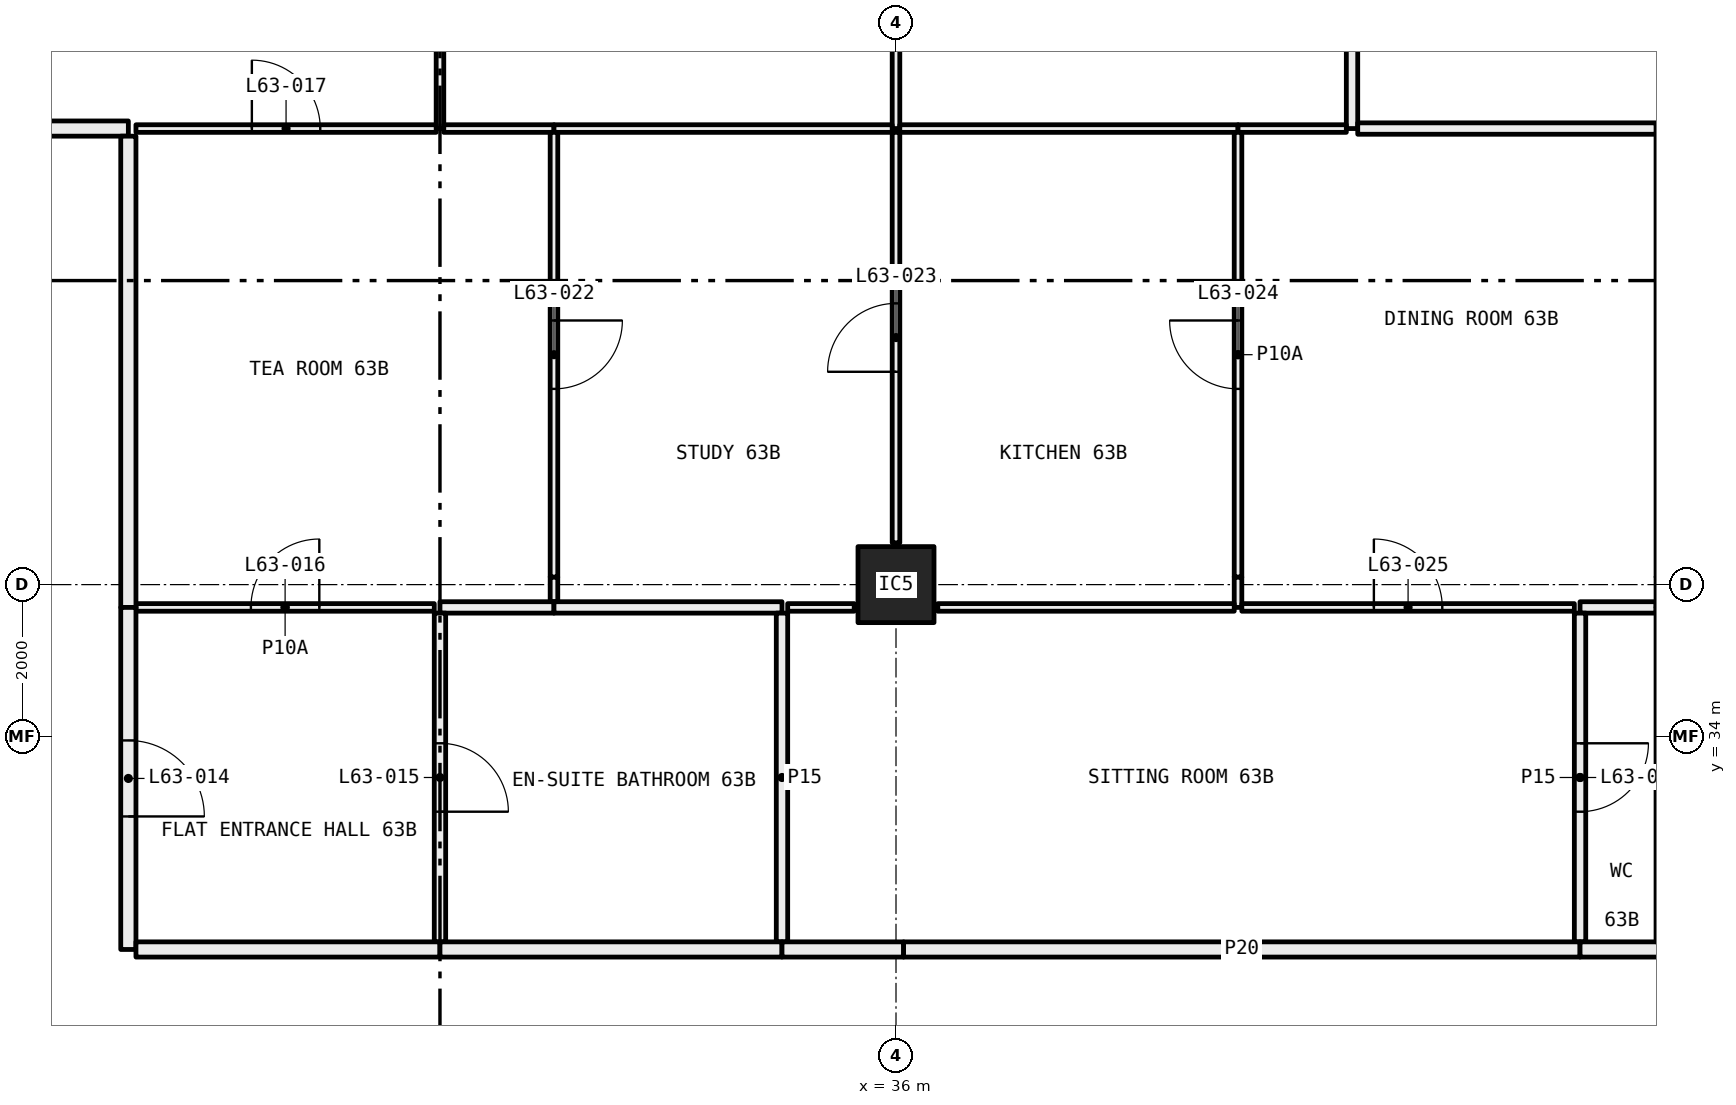
"""IFC4 building model, lengths in metres.
Left out: names, types, materials, properties, quantities, classifications, styles, units other than length and angle.
Written with IfcOpenShell. Run it as: python <this file> out.ifc"""

import sys

from ifc_helpers import new_model, si_unit, direction, frame, frame_2d, origin, origin_2d, place, context, subcontext, project, spatial, rectangle, hollow_rectangle, extrude, element, fill, save


model = new_model("IFC4")
c1 = context("Model", 3, precision=1e-05, world=origin(), true_north=direction((0.0, 1.0)))
c2 = subcontext(c1, "Body", "Model", "MODEL_VIEW")
j1 = project(units=[si_unit("LENGTHUNIT", "METRE"), si_unit("PLANEANGLEUNIT", "RADIAN")], contexts=[c1])
p1 = place(None, origin())
s1 = spatial("IfcSite", under=j1, at=p1, CompositionType="ELEMENT")
p2 = place(p1, origin())
s2 = spatial("IfcBuilding", under=s1, at=p2, CompositionType="ELEMENT")
p3 = place(p2, frame((0.0, 0.0, 235.2)))
s3 = spatial("IfcBuildingStorey", under=s2, at=p3, CompositionType="ELEMENT", Elevation=235.2)
p4 = place(p3, frame((36.0, 36.0, 0.0), z_axis=(0.0, 0.0, 1.0), x_axis=(1.0, 0.0, 0.0)))
e1 = element("IfcColumn", 1, at=p4, inside=s3, PredefinedType="COLUMN", context=c2, shape_type="SweptSolid", body=[
    extrude(hollow_rectangle(XDim=1.0, YDim=1.0, WallThickness=0.04, at=origin_2d()), origin(), (0.0, 0.0, 1.0), 3.05),
])
p5 = place(p3, frame((30.0, 42.0, 0.0), z_axis=(0.0, 0.0, 1.0), x_axis=(0.0, 1.0, 0.0)))
e2 = element("IfcWall", 2, at=p5, inside=s3, PredefinedType="PARTITIONING", context=c2, shape_type="SweptSolid", body=[
    extrude(rectangle(XDim=5.28, YDim=0.1, at=frame_2d((2.64, 0.0))), origin(), (0.0, 0.0, 1.0), 3.05),
])
p6 = place(p5, frame((2.19, 0.0, 0.0)))
e3 = element("IfcOpeningElement", 3, at=p6, cuts=e2, PredefinedType="OPENING", context=c2, shape_type="SweptSolid", body=[
    extrude(rectangle(XDim=0.9, YDim=2.1, at=frame_2d((0.45, 1.05))), frame((0.0, 0.06, 0.0), z_axis=(0.0, -1.0, 0.0), x_axis=(1.0, 0.0, 0.0)), (0.0, 0.0, 1.0), 0.12),
])
p7 = place(p3, frame((26.0, 42.0, 0.0), z_axis=(0.0, 0.0, 1.0), x_axis=(1.0, 0.0, 0.0)))
e4 = element("IfcWall", 4, at=p7, inside=s3, PredefinedType="PARTITIONING", context=c2, shape_type="SweptSolid", body=[
    extrude(rectangle(XDim=3.95, YDim=0.1, at=frame_2d((1.975, 0.0))), origin(), (0.0, 0.0, 1.0), 3.05),
])
p8 = place(p7, frame((1.525, 0.0, 0.0)))
e5 = element("IfcOpeningElement", 5, at=p8, cuts=e4, PredefinedType="OPENING", context=c2, shape_type="SweptSolid", body=[
    extrude(rectangle(XDim=0.9, YDim=2.1, at=frame_2d((0.45, 1.05))), frame((0.0, 0.06, 0.0), z_axis=(0.0, -1.0, 0.0), x_axis=(1.0, 0.0, 0.0)), (0.0, 0.0, 1.0), 0.12),
])
p9 = place(p3, frame((24.0, 42.0, 0.0), z_axis=(0.0, 0.0, 1.0), x_axis=(1.0, 0.0, 0.0)))
e6 = element("IfcWall", 6, at=p9, inside=s3, PredefinedType="PARTITIONING", context=c2, shape_type="SweptSolid", body=[
    extrude(rectangle(XDim=1.9, YDim=0.2, at=frame_2d((0.95, 0.0))), origin(), (0.0, 0.0, 1.0), 3.05),
])
p10 = place(p3, frame((36.0, 42.0, 0.0), z_axis=(0.0, 0.0, 1.0), x_axis=(0.0, 1.0, 0.0)))
e7 = element("IfcWall", 7, at=p10, inside=s3, PredefinedType="PARTITIONING", context=c2, shape_type="SweptSolid", body=[
    extrude(rectangle(XDim=5.28, YDim=0.1, at=frame_2d((2.64, 0.0))), origin(), (0.0, 0.0, 1.0), 2.45),
])
p11 = place(p10, frame((2.19, 0.0, 0.0)))
e8 = element("IfcOpeningElement", 8, at=p11, cuts=e7, PredefinedType="OPENING", context=c2, shape_type="SweptSolid", body=[
    extrude(rectangle(XDim=0.9, YDim=2.1, at=frame_2d((0.45, 1.05))), frame((0.0, 0.06, 0.0), z_axis=(0.0, -1.0, 0.0), x_axis=(1.0, 0.0, 0.0)), (0.0, 0.0, 1.0), 0.12),
])
p12 = place(p3, frame((30.05, 42.0, 0.0), z_axis=(0.0, 0.0, 1.0), x_axis=(1.0, 0.0, 0.0)))
e9 = element("IfcWall", 9, at=p12, inside=s3, PredefinedType="PARTITIONING", context=c2, shape_type="SweptSolid", body=[
    extrude(rectangle(XDim=1.45, YDim=0.1, at=frame_2d((0.725, 0.0))), origin(), (0.0, 0.0, 1.0), 3.05),
])
p13 = place(p3, frame((31.5, 42.0, 0.0), z_axis=(0.0, 0.0, 1.0), x_axis=(1.0, 0.0, 0.0)))
e10 = element("IfcWall", 10, at=p13, inside=s3, PredefinedType="PARTITIONING", context=c2, shape_type="SweptSolid", body=[
    extrude(rectangle(XDim=4.45, YDim=0.1, at=frame_2d((2.225, 0.0))), origin(), (0.0, 0.0, 1.0), 2.45),
])
p14 = place(p3, frame((42.0, 42.0, 0.0), z_axis=(0.0, 0.0, 1.0), x_axis=(0.0, 1.0, 0.0)))
e11 = element("IfcWall", 11, at=p14, inside=s3, PredefinedType="PARTITIONING", context=c2, shape_type="SweptSolid", body=[
    extrude(rectangle(XDim=3.0, YDim=0.15, at=frame_2d((1.5, 0.0))), origin(), (0.0, 0.0, 1.0), 3.05),
])
p15 = place(p14, frame((1.05, 0.0, 0.0)))
e12 = element("IfcOpeningElement", 12, at=p15, cuts=e11, PredefinedType="OPENING", context=c2, shape_type="SweptSolid", body=[
    extrude(rectangle(XDim=0.9, YDim=2.1, at=frame_2d((0.45, 1.05))), frame((0.0, 0.085, 0.0), z_axis=(0.0, -1.0, 0.0), x_axis=(1.0, 0.0, 0.0)), (0.0, 0.0, 1.0), 0.17),
])
p16 = place(p3, frame((36.05, 42.0, 0.0), z_axis=(0.0, 0.0, 1.0), x_axis=(1.0, 0.0, 0.0)))
e13 = element("IfcWall", 13, at=p16, inside=s3, PredefinedType="PARTITIONING", context=c2, shape_type="SweptSolid", body=[
    extrude(rectangle(XDim=4.45, YDim=0.1, at=frame_2d((2.225, 0.0))), origin(), (0.0, 0.0, 1.0), 2.45),
])
p17 = place(p3, frame((40.5, 42.0, 0.0), z_axis=(0.0, 0.0, 1.0), x_axis=(1.0, 0.0, 0.0)))
e14 = element("IfcWall", 14, at=p17, inside=s3, PredefinedType="PARTITIONING", context=c2, shape_type="SweptSolid", body=[
    extrude(rectangle(XDim=1.425, YDim=0.1, at=frame_2d((0.712, 0.0))), origin(), (0.0, 0.0, 1.0), 3.05),
])
p18 = place(p3, frame((42.075, 42.0, 0.0), z_axis=(0.0, 0.0, 1.0), x_axis=(1.0, 0.0, 0.0)))
e15 = element("IfcWall", 15, at=p18, inside=s3, PredefinedType="PARTITIONING", context=c2, shape_type="SweptSolid", body=[
    extrude(rectangle(XDim=3.925, YDim=0.15, at=frame_2d((1.962, 0.0))), origin(), (0.0, 0.0, 1.0), 3.05),
])
p19 = place(p3, frame((31.5, 35.775, 0.0), z_axis=(0.0, 0.0, 1.0), x_axis=(0.0, 1.0, 0.0)))
e16 = element("IfcWall", 16, at=p19, inside=s3, PredefinedType="PARTITIONING", context=c2, shape_type="SweptSolid", body=[
    extrude(rectangle(XDim=0.325, YDim=0.1, at=frame_2d((0.163, 0.0))), origin(), (0.0, 0.0, 1.0), 2.45),
])
p20 = place(p3, frame((31.5, 36.1, 0.0), z_axis=(0.0, 0.0, 1.0), x_axis=(0.0, 1.0, 0.0)))
e17 = element("IfcWall", 17, at=p20, inside=s3, PredefinedType="PARTITIONING", context=c2, shape_type="SweptSolid", body=[
    extrude(rectangle(XDim=5.85, YDim=0.1, at=frame_2d((2.925, 0.0))), origin(), (0.0, 0.0, 1.0), 3.05),
])
p21 = place(p20, frame((2.475, 0.0, 0.0)))
e18 = element("IfcOpeningElement", 18, at=p21, cuts=e17, PredefinedType="OPENING", context=c2, shape_type="SweptSolid", body=[
    extrude(rectangle(XDim=0.9, YDim=2.1, at=frame_2d((0.45, 1.05))), frame((0.0, 0.06, 0.0), z_axis=(0.0, -1.0, 0.0), x_axis=(1.0, 0.0, 0.0)), (0.0, 0.0, 1.0), 0.12),
])
p22 = place(p3, frame((26.0, 35.7, 0.0), z_axis=(0.0, 0.0, 1.0), x_axis=(1.0, 0.0, 0.0)))
e19 = element("IfcWall", 19, at=p22, inside=s3, PredefinedType="PARTITIONING", context=c2, shape_type="SweptSolid", body=[
    extrude(rectangle(XDim=3.925, YDim=0.1, at=frame_2d((1.962, 0.0))), origin(), (0.0, 0.0, 1.0), 3.05),
])
p23 = place(p22, frame((1.512, 0.0, 0.0)))
e20 = element("IfcOpeningElement", 20, at=p23, cuts=e19, PredefinedType="OPENING", context=c2, shape_type="SweptSolid", body=[
    extrude(rectangle(XDim=0.9, YDim=2.1, at=frame_2d((0.45, 1.05))), frame((0.0, 0.06, 0.0), z_axis=(0.0, -1.0, 0.0), x_axis=(1.0, 0.0, 0.0)), (0.0, 0.0, 1.0), 0.12),
])
p24 = place(p3, frame((30.0, 35.7, 0.0), z_axis=(0.0, 0.0, 1.0), x_axis=(1.0, 0.0, 0.0)))
e21 = element("IfcWall", 21, at=p24, inside=s3, PredefinedType="PARTITIONING", context=c2, shape_type="SweptSolid", body=[
    extrude(rectangle(XDim=1.5, YDim=0.15, at=frame_2d((0.75, 0.0))), origin(), (0.0, 0.0, 1.0), 3.05),
])
p25 = place(p3, frame((25.9, 41.9, 0.0), z_axis=(0.0, 0.0, 1.0), x_axis=(0.0, -1.0, 0.0)))
e22 = element("IfcWall", 22, at=p25, inside=s3, PredefinedType="PARTITIONING", context=c2, shape_type="SweptSolid", body=[
    extrude(rectangle(XDim=6.2, YDim=0.2, at=frame_2d((3.1, 0.0))), origin(), (0.0, 0.0, 1.0), 2.45),
])
p26 = place(p3, frame((36.0, 36.55, 0.0), z_axis=(0.0, 0.0, 1.0), x_axis=(0.0, 1.0, 0.0)))
e23 = element("IfcWall", 23, at=p26, inside=s3, PredefinedType="PARTITIONING", context=c2, shape_type="SweptSolid", body=[
    extrude(rectangle(XDim=5.4, YDim=0.1, at=frame_2d((2.7, 0.0))), origin(), (0.0, 0.0, 1.0), 2.45),
])
p27 = place(p26, frame((2.25, 0.0, 0.0)))
e24 = element("IfcOpeningElement", 24, at=p27, cuts=e23, PredefinedType="OPENING", context=c2, shape_type="SweptSolid", body=[
    extrude(rectangle(XDim=0.9, YDim=2.1, at=frame_2d((0.45, 1.05))), frame((0.0, 0.06, 0.0), z_axis=(0.0, -1.0, 0.0), x_axis=(1.0, 0.0, 0.0)), (0.0, 0.0, 1.0), 0.12),
])
p28 = place(p3, frame((31.5, 35.7, 0.0), z_axis=(0.0, 0.0, 1.0), x_axis=(1.0, 0.0, 0.0)))
e25 = element("IfcWall", 25, at=p28, inside=s3, PredefinedType="PARTITIONING", context=c2, shape_type="SweptSolid", body=[
    extrude(rectangle(XDim=3.0, YDim=0.15, at=frame_2d((1.5, 0.0))), origin(), (0.0, 0.0, 1.0), 3.05),
])
p29 = place(p3, frame((34.575, 35.7, 0.0), z_axis=(0.0, 0.0, 1.0), x_axis=(1.0, 0.0, 0.0)))
e26 = element("IfcWall", 26, at=p29, inside=s3, PredefinedType="PARTITIONING", context=c2, shape_type="SweptSolid", body=[
    extrude(rectangle(XDim=0.875, YDim=0.1, at=frame_2d((0.438, 0.0))), origin(), (0.0, 0.0, 1.0), 3.05),
])
p30 = place(p3, frame((40.5, 35.7, 0.0), z_axis=(0.0, 0.0, 1.0), x_axis=(0.0, 1.0, 0.0)))
e27 = element("IfcWall", 27, at=p30, inside=s3, PredefinedType="PARTITIONING", context=c2, shape_type="SweptSolid", body=[
    extrude(rectangle(XDim=0.4, YDim=0.1, at=frame_2d((0.2, 0.0))), origin(), (0.0, 0.0, 1.0), 2.45),
])
p31 = place(p3, frame((40.5, 36.1, 0.0), z_axis=(0.0, 0.0, 1.0), x_axis=(0.0, 1.0, 0.0)))
e28 = element("IfcWall", 28, at=p31, inside=s3, PredefinedType="PARTITIONING", context=c2, shape_type="SweptSolid", body=[
    extrude(rectangle(XDim=5.85, YDim=0.1, at=frame_2d((2.925, 0.0))), origin(), (0.0, 0.0, 1.0), 3.05),
])
p32 = place(p31, frame((2.475, 0.0, 0.0)))
e29 = element("IfcOpeningElement", 29, at=p32, cuts=e28, PredefinedType="OPENING", context=c2, shape_type="SweptSolid", body=[
    extrude(rectangle(XDim=0.9, YDim=2.1, at=frame_2d((0.45, 1.05))), frame((0.0, 0.06, 0.0), z_axis=(0.0, -1.0, 0.0), x_axis=(1.0, 0.0, 0.0)), (0.0, 0.0, 1.0), 0.12),
])
p33 = place(p3, frame((36.55, 35.7, 0.0), z_axis=(0.0, 0.0, 1.0), x_axis=(1.0, 0.0, 0.0)))
e30 = element("IfcWall", 30, at=p33, inside=s3, PredefinedType="PARTITIONING", context=c2, shape_type="SweptSolid", body=[
    extrude(rectangle(XDim=3.9, YDim=0.1, at=frame_2d((1.95, 0.0))), origin(), (0.0, 0.0, 1.0), 3.05),
])
p34 = place(p3, frame((40.55, 35.7, 0.0), z_axis=(0.0, 0.0, 1.0), x_axis=(1.0, 0.0, 0.0)))
e31 = element("IfcWall", 31, at=p34, inside=s3, PredefinedType="PARTITIONING", context=c2, shape_type="SweptSolid", body=[
    extrude(rectangle(XDim=4.375, YDim=0.1, at=frame_2d((2.188, 0.0))), origin(), (0.0, 0.0, 1.0), 3.05),
])
p35 = place(p34, frame((1.738, 0.0, 0.0)))
e32 = element("IfcOpeningElement", 32, at=p35, cuts=e31, PredefinedType="OPENING", context=c2, shape_type="SweptSolid", body=[
    extrude(rectangle(XDim=0.9, YDim=2.1, at=frame_2d((0.45, 1.05))), frame((0.0, 0.06, 0.0), z_axis=(0.0, -1.0, 0.0), x_axis=(1.0, 0.0, 0.0)), (0.0, 0.0, 1.0), 0.12),
])
p36 = place(p3, frame((45.0, 35.7, 0.0), z_axis=(0.0, 0.0, 1.0), x_axis=(1.0, 0.0, 0.0)))
e33 = element("IfcWall", 33, at=p36, inside=s3, PredefinedType="PARTITIONING", context=c2, shape_type="SweptSolid", body=[
    extrude(rectangle(XDim=1.0, YDim=0.15, at=frame_2d((0.5, 0.0))), origin(), (0.0, 0.0, 1.0), 3.05),
])
p37 = place(p3, frame((30.0, 31.3, 0.0), z_axis=(0.0, 0.0, 1.0), x_axis=(0.0, 1.0, 0.0)))
e34 = element("IfcWall", 34, at=p37, inside=s3, PredefinedType="PARTITIONING", context=c2, shape_type="SweptSolid", body=[
    extrude(rectangle(XDim=4.325, YDim=0.15, at=frame_2d((2.163, 0.0))), origin(), (0.0, 0.0, 1.0), 3.05),
])
p38 = place(p37, frame((1.712, 0.0, 0.0)))
e35 = element("IfcOpeningElement", 35, at=p38, cuts=e34, PredefinedType="OPENING", context=c2, shape_type="SweptSolid", body=[
    extrude(rectangle(XDim=0.9, YDim=2.1, at=frame_2d((0.45, 1.05))), frame((0.0, 0.085, 0.0), z_axis=(0.0, -1.0, 0.0), x_axis=(1.0, 0.0, 0.0)), (0.0, 0.0, 1.0), 0.17),
])
p39 = place(p3, frame((25.9, 35.7, 0.0), z_axis=(0.0, 0.0, 1.0), x_axis=(0.0, -1.0, 0.0)))
e36 = element("IfcWall", 36, at=p39, inside=s3, PredefinedType="PARTITIONING", context=c2, shape_type="SweptSolid", body=[
    extrude(rectangle(XDim=4.5, YDim=0.2, at=frame_2d((2.25, 0.0))), origin(), (0.0, 0.0, 1.0), 3.05),
])
p40 = place(p39, frame((1.75, 0.0, 0.0)))
e37 = element("IfcOpeningElement", 37, at=p40, cuts=e36, PredefinedType="OPENING", context=c2, shape_type="SweptSolid", body=[
    extrude(rectangle(XDim=1.0, YDim=2.1, at=frame_2d((0.5, 1.05))), frame((0.0, 0.11, 0.0), z_axis=(0.0, -1.0, 0.0), x_axis=(1.0, 0.0, 0.0)), (0.0, 0.0, 1.0), 0.22),
])
p41 = place(p3, frame((26.0, 31.2, 0.0), z_axis=(0.0, 0.0, 1.0), x_axis=(1.0, 0.0, 0.0)))
e38 = element("IfcWall", 38, at=p41, inside=s3, PredefinedType="PARTITIONING", context=c2, shape_type="SweptSolid", body=[
    extrude(rectangle(XDim=4.0, YDim=0.2, at=frame_2d((2.0, 0.0))), origin(), (0.0, 0.0, 1.0), 3.05),
])
p42 = place(p3, frame((34.5, 31.3, 0.0), z_axis=(0.0, 0.0, 1.0), x_axis=(0.0, 1.0, 0.0)))
e39 = element("IfcWall", 39, at=p42, inside=s3, PredefinedType="PARTITIONING", context=c2, shape_type="SweptSolid", body=[
    extrude(rectangle(XDim=4.325, YDim=0.15, at=frame_2d((2.163, 0.0))), origin(), (0.0, 0.0, 1.0), 3.05),
])
p43 = place(p3, frame((30.0, 31.2, 0.0), z_axis=(0.0, 0.0, 1.0), x_axis=(1.0, 0.0, 0.0)))
e40 = element("IfcWall", 40, at=p43, inside=s3, PredefinedType="PARTITIONING", context=c2, shape_type="SweptSolid", body=[
    extrude(rectangle(XDim=4.5, YDim=0.2, at=frame_2d((2.25, 0.0))), origin(), (0.0, 0.0, 1.0), 3.05),
])
p44 = place(p3, frame((45.0, 31.3, 0.0), z_axis=(0.0, 0.0, 1.0), x_axis=(0.0, 1.0, 0.0)))
e41 = element("IfcWall", 41, at=p44, inside=s3, PredefinedType="PARTITIONING", context=c2, shape_type="SweptSolid", body=[
    extrude(rectangle(XDim=4.325, YDim=0.15, at=frame_2d((2.163, 0.0))), origin(), (0.0, 0.0, 1.0), 3.05),
])
p45 = place(p44, frame((1.712, 0.0, 0.0)))
e42 = element("IfcOpeningElement", 42, at=p45, cuts=e41, PredefinedType="OPENING", context=c2, shape_type="SweptSolid", body=[
    extrude(rectangle(XDim=0.9, YDim=2.1, at=frame_2d((0.45, 1.05))), frame((0.0, 0.085, 0.0), z_axis=(0.0, -1.0, 0.0), x_axis=(1.0, 0.0, 0.0)), (0.0, 0.0, 1.0), 0.17),
])
p46 = place(p3, frame((34.5, 31.2, 0.0), z_axis=(0.0, 0.0, 1.0), x_axis=(1.0, 0.0, 0.0)))
e43 = element("IfcWall", 43, at=p46, inside=s3, PredefinedType="PARTITIONING", context=c2, shape_type="SweptSolid", body=[
    extrude(rectangle(XDim=1.6, YDim=0.2, at=frame_2d((0.8, 0.0))), origin(), (0.0, 0.0, 1.0), 2.45),
])
p47 = place(p3, frame((36.1, 31.2, 0.0), z_axis=(0.0, 0.0, 1.0), x_axis=(1.0, 0.0, 0.0)))
e44 = element("IfcWall", 44, at=p47, inside=s3, PredefinedType="PARTITIONING", context=c2, shape_type="SweptSolid", body=[
    extrude(rectangle(XDim=8.9, YDim=0.2, at=frame_2d((4.45, 0.0))), origin(), (0.0, 0.0, 1.0), 3.05),
])
p48 = place(p3, frame((45.0, 31.2, 0.0), z_axis=(0.0, 0.0, 1.0), x_axis=(1.0, 0.0, 0.0)))
e45 = element("IfcWall", 45, at=p48, inside=s3, PredefinedType="PARTITIONING", context=c2, shape_type="SweptSolid", body=[
    extrude(rectangle(XDim=1.1, YDim=0.2, at=frame_2d((0.55, 0.0))), origin(), (0.0, 0.0, 1.0), 3.05),
])
p49 = place(p40, origin())
e46 = element("IfcDoor", 46, at=p49, inside=s3, OperationType="SINGLE_SWING_LEFT", PredefinedType="DOOR", context=c2, shape_type="SweptSolid", body=[
    extrude(rectangle(XDim=1.0, YDim=2.1, at=frame_2d((0.5, 1.05))), frame((0.0, 0.025, 0.0), z_axis=(0.0, -1.0, 0.0), x_axis=(1.0, 0.0, 0.0)), (0.0, 0.0, 1.0), 0.05),
])
fill(e37, e46)
p50 = place(p38, frame((0.9, 0.0, 0.0), x_axis=(-1.0, 0.0, 0.0)))
e47 = element("IfcDoor", 47, at=p50, inside=s3, OperationType="SINGLE_SWING_LEFT", PredefinedType="DOOR", context=c2, shape_type="SweptSolid", body=[
    extrude(rectangle(XDim=0.9, YDim=2.1, at=frame_2d((0.45, 1.05))), frame((0.0, 0.025, 0.0), z_axis=(0.0, -1.0, 0.0), x_axis=(1.0, 0.0, 0.0)), (0.0, 0.0, 1.0), 0.05),
])
fill(e35, e47)
p51 = place(p23, origin())
e48 = element("IfcDoor", 48, at=p51, inside=s3, OperationType="SINGLE_SWING_LEFT", PredefinedType="DOOR", context=c2, shape_type="SweptSolid", body=[
    extrude(rectangle(XDim=0.9, YDim=2.1, at=frame_2d((0.45, 1.05))), frame((0.0, 0.025, 0.0), z_axis=(0.0, -1.0, 0.0), x_axis=(1.0, 0.0, 0.0)), (0.0, 0.0, 1.0), 0.05),
])
fill(e20, e48)
p52 = place(p8, origin())
e49 = element("IfcDoor", 49, at=p52, inside=s3, OperationType="SINGLE_SWING_RIGHT", PredefinedType="DOOR", context=c2, shape_type="SweptSolid", body=[
    extrude(rectangle(XDim=0.9, YDim=2.1, at=frame_2d((0.45, 1.05))), frame((0.0, 0.025, 0.0), z_axis=(0.0, -1.0, 0.0), x_axis=(1.0, 0.0, 0.0)), (0.0, 0.0, 1.0), 0.05),
])
fill(e5, e49)
p53 = place(p21, frame((0.9, 0.0, 0.0), x_axis=(-1.0, 0.0, 0.0)))
e50 = element("IfcDoor", 50, at=p53, inside=s3, OperationType="SINGLE_SWING_RIGHT", PredefinedType="DOOR", context=c2, shape_type="SweptSolid", body=[
    extrude(rectangle(XDim=0.9, YDim=2.1, at=frame_2d((0.45, 1.05))), frame((0.0, 0.025, 0.0), z_axis=(0.0, -1.0, 0.0), x_axis=(1.0, 0.0, 0.0)), (0.0, 0.0, 1.0), 0.05),
])
fill(e18, e50)
p54 = place(p27, origin())
e51 = element("IfcDoor", 51, at=p54, inside=s3, OperationType="SINGLE_SWING_RIGHT", PredefinedType="DOOR", context=c2, shape_type="SweptSolid", body=[
    extrude(rectangle(XDim=0.9, YDim=2.1, at=frame_2d((0.45, 1.05))), frame((0.0, 0.025, 0.0), z_axis=(0.0, -1.0, 0.0), x_axis=(1.0, 0.0, 0.0)), (0.0, 0.0, 1.0), 0.05),
])
fill(e24, e51)
p55 = place(p32, origin())
e52 = element("IfcDoor", 52, at=p55, inside=s3, OperationType="SINGLE_SWING_LEFT", PredefinedType="DOOR", context=c2, shape_type="SweptSolid", body=[
    extrude(rectangle(XDim=0.9, YDim=2.1, at=frame_2d((0.45, 1.05))), frame((0.0, 0.025, 0.0), z_axis=(0.0, -1.0, 0.0), x_axis=(1.0, 0.0, 0.0)), (0.0, 0.0, 1.0), 0.05),
])
fill(e29, e52)
p56 = place(p35, origin())
e53 = element("IfcDoor", 53, at=p56, inside=s3, OperationType="SINGLE_SWING_RIGHT", PredefinedType="DOOR", context=c2, shape_type="SweptSolid", body=[
    extrude(rectangle(XDim=0.9, YDim=2.1, at=frame_2d((0.45, 1.05))), frame((0.0, 0.025, 0.0), z_axis=(0.0, -1.0, 0.0), x_axis=(1.0, 0.0, 0.0)), (0.0, 0.0, 1.0), 0.05),
])
fill(e32, e53)
p57 = place(p45, frame((0.9, 0.0, 0.0), x_axis=(-1.0, 0.0, 0.0)))
e54 = element("IfcDoor", 54, at=p57, inside=s3, OperationType="SINGLE_SWING_RIGHT", PredefinedType="DOOR", context=c2, shape_type="SweptSolid", body=[
    extrude(rectangle(XDim=0.9, YDim=2.1, at=frame_2d((0.45, 1.05))), frame((0.0, 0.025, 0.0), z_axis=(0.0, -1.0, 0.0), x_axis=(1.0, 0.0, 0.0)), (0.0, 0.0, 1.0), 0.05),
])
fill(e42, e54)
save(model, sys.argv[1])
